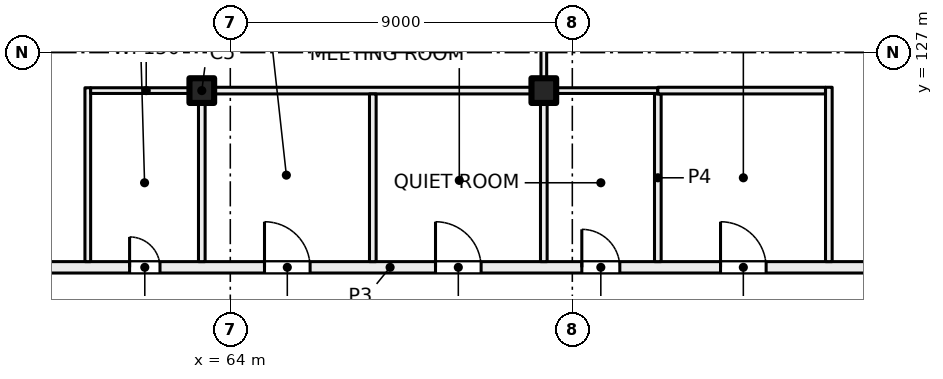
"""IFC4 building model, lengths in metres.
Left out: names, types, materials, properties, quantities, classifications, styles, units other than length and angle.
Written with IfcOpenShell. Run it as: python <this file> out.ifc"""

import sys

from ifc_helpers import new_model, si_unit, direction, frame, frame_2d, origin, origin_2d, place, context, subcontext, project, spatial, rectangle, extrude, element, fill, save


model = new_model("IFC4")
c1 = context("Model", 3, precision=1e-05, world=origin(), true_north=direction((0.0, 1.0)))
c2 = subcontext(c1, "Body", "Model", "MODEL_VIEW")
j1 = project(units=[si_unit("LENGTHUNIT", "METRE"), si_unit("PLANEANGLEUNIT", "RADIAN")], contexts=[c1])
p1 = place(None, origin())
s1 = spatial("IfcSite", under=j1, at=p1, CompositionType="ELEMENT")
p2 = place(p1, origin())
s2 = spatial("IfcBuilding", under=s1, at=p2, CompositionType="ELEMENT")
p3 = place(p2, frame((0.0, 0.0, 142.5)))
s3 = spatial("IfcBuildingStorey", under=s2, at=p3, CompositionType="ELEMENT", Elevation=142.5)
for number, where, z_axis, x_axis in (
    (1, (63.25, 126.0, 0.0), (0.0, 0.0, 1.0), (1.0, 0.0, 0.0)),
    (2, (72.25, 126.0, 0.0), (0.0, 0.0, 1.0), (1.0, 0.0, 0.0)),
):
    element("IfcColumn", number, at=place(p3, frame(where, z_axis=z_axis, x_axis=x_axis)), inside=s3, PredefinedType="COLUMN", context=c2, shape_type="SweptSolid", body=[
        extrude(rectangle(XDim=0.65, YDim=0.65, at=origin_2d()), origin(), (0.0, 0.0, 1.0), 4.0),
    ])
p4 = place(p3, frame((50.657, 121.35, 0.0), z_axis=(0.0, 0.0, 1.0), x_axis=(1.0, 0.0, 0.0)))
e3 = element("IfcWall", 3, at=p4, inside=s3, PredefinedType="PARTITIONING", context=c2, shape_type="SweptSolid", body=[
    extrude(rectangle(XDim=35.096, YDim=0.3, at=frame_2d((17.548, 0.0))), origin(), (0.0, 0.0, 1.0), 3.625),
])
p5 = place(p4, frame((26.243, 0.0, 0.0)))
e4 = element("IfcOpeningElement", 4, at=p5, cuts=e3, PredefinedType="OPENING", context=c2, shape_type="SweptSolid", body=[
    extrude(rectangle(XDim=1.2, YDim=2.1, at=frame_2d((0.6, 1.05))), frame((0.0, 0.16, 0.0), z_axis=(0.0, -1.0, 0.0), x_axis=(1.0, 0.0, 0.0)), (0.0, 0.0, 1.0), 0.32),
])
p6 = place(p4, frame((22.593, 0.0, 0.0)))
e5 = element("IfcOpeningElement", 5, at=p6, cuts=e3, PredefinedType="OPENING", context=c2, shape_type="SweptSolid", body=[
    extrude(rectangle(XDim=1.0, YDim=2.1, at=frame_2d((0.5, 1.05))), frame((0.0, 0.16, 0.0), z_axis=(0.0, -1.0, 0.0), x_axis=(1.0, 0.0, 0.0)), (0.0, 0.0, 1.0), 0.32),
])
p7 = place(p4, frame((31.193, 0.0, 0.0)))
e6 = element("IfcOpeningElement", 6, at=p7, cuts=e3, PredefinedType="OPENING", context=c2, shape_type="SweptSolid", body=[
    extrude(rectangle(XDim=1.8, YDim=2.1, at=frame_2d((0.9, 1.05))), frame((0.0, 0.16, 0.0), z_axis=(0.0, -1.0, 0.0), x_axis=(1.0, 0.0, 0.0)), (0.0, 0.0, 1.0), 0.32),
])
p8 = place(p4, frame((18.743, 0.0, 0.0)))
e7 = element("IfcOpeningElement", 7, at=p8, cuts=e3, PredefinedType="OPENING", context=c2, shape_type="SweptSolid", body=[
    extrude(rectangle(XDim=1.2, YDim=2.1, at=frame_2d((0.6, 1.05))), frame((0.0, 0.16, 0.0), z_axis=(0.0, -1.0, 0.0), x_axis=(1.0, 0.0, 0.0)), (0.0, 0.0, 1.0), 0.32),
])
p9 = place(p4, frame((14.243, 0.0, 0.0)))
e8 = element("IfcOpeningElement", 8, at=p9, cuts=e3, PredefinedType="OPENING", context=c2, shape_type="SweptSolid", body=[
    extrude(rectangle(XDim=1.2, YDim=2.1, at=frame_2d((0.6, 1.05))), frame((0.0, 0.16, 0.0), z_axis=(0.0, -1.0, 0.0), x_axis=(1.0, 0.0, 0.0)), (0.0, 0.0, 1.0), 0.32),
])
p10 = place(p4, frame((10.693, 0.0, 0.0)))
e9 = element("IfcOpeningElement", 9, at=p10, cuts=e3, PredefinedType="OPENING", context=c2, shape_type="SweptSolid", body=[
    extrude(rectangle(XDim=0.8, YDim=2.1, at=frame_2d((0.4, 1.05))), frame((0.0, 0.16, 0.0), z_axis=(0.0, -1.0, 0.0), x_axis=(1.0, 0.0, 0.0)), (0.0, 0.0, 1.0), 0.32),
])
p11 = place(p4, frame((5.693, 0.0, 0.0)))
e10 = element("IfcOpeningElement", 10, at=p11, cuts=e3, PredefinedType="OPENING", context=c2, shape_type="SweptSolid", body=[
    extrude(rectangle(XDim=1.8, YDim=2.1, at=frame_2d((0.9, 1.05))), frame((0.0, 0.16, 0.0), z_axis=(0.0, -1.0, 0.0), x_axis=(1.0, 0.0, 0.0)), (0.0, 0.0, 1.0), 0.32),
])
p12 = place(p4, frame((0.896, 0.0, 0.0)))
e11 = element("IfcOpeningElement", 11, at=p12, cuts=e3, PredefinedType="OPENING", context=c2, shape_type="SweptSolid", body=[
    extrude(rectangle(XDim=1.8, YDim=2.1, at=frame_2d((0.9, 1.05))), frame((0.0, 0.16, 0.0), z_axis=(0.0, -1.0, 0.0), x_axis=(1.0, 0.0, 0.0)), (0.0, 0.0, 1.0), 0.32),
])
p13 = place(p3, frame((60.25, 126.075, 0.0), z_axis=(0.0, 0.0, 1.0), x_axis=(0.0, -1.0, 0.0)))
e12 = element("IfcWall", 12, at=p13, inside=s3, PredefinedType="PARTITIONING", context=c2, shape_type="SweptSolid", body=[
    extrude(rectangle(XDim=4.575, YDim=0.15, at=frame_2d((2.288, 0.0))), origin(), (0.0, 0.0, 1.0), 3.625),
])
p14 = place(p3, frame((63.25, 121.5, 0.0), z_axis=(0.0, 0.0, 1.0), x_axis=(0.0, 1.0, 0.0)))
e13 = element("IfcWall", 13, at=p14, inside=s3, PredefinedType="PARTITIONING", context=c2, shape_type="SweptSolid", body=[
    extrude(rectangle(XDim=4.412, YDim=0.175, at=frame_2d((2.206, 0.0))), origin(), (0.0, 0.0, 1.0), 3.625),
])
p15 = place(p3, frame((63.25, 126.0, 0.0), z_axis=(0.0, 0.0, 1.0), x_axis=(-1.0, 0.0, 0.0)))
e14 = element("IfcWall", 14, at=p15, inside=s3, PredefinedType="PARTITIONING", context=c2, shape_type="SweptSolid", body=[
    extrude(rectangle(XDim=2.925, YDim=0.15, at=frame_2d((1.462, 0.0))), origin(), (0.0, 0.0, 1.0), 3.625),
])
p16 = place(p3, frame((63.25, 126.0, 0.0), z_axis=(0.0, 0.0, 1.0), x_axis=(1.0, 0.0, 0.0)))
e15 = element("IfcWall", 15, at=p16, inside=s3, PredefinedType="PARTITIONING", context=c2, shape_type="SweptSolid", body=[
    extrude(rectangle(XDim=9.0, YDim=0.175, at=frame_2d((4.5, 0.0))), origin(), (0.0, 0.0, 1.0), 3.625),
])
p17 = place(p3, frame((67.75, 121.5, 0.0), z_axis=(0.0, 0.0, 1.0), x_axis=(0.0, 1.0, 0.0)))
e16 = element("IfcWall", 16, at=p17, inside=s3, PredefinedType="PARTITIONING", context=c2, shape_type="SweptSolid", body=[
    extrude(rectangle(XDim=4.412, YDim=0.175, at=frame_2d((2.206, 0.0))), origin(), (0.0, 0.0, 1.0), 3.625),
])
p18 = place(p3, frame((72.25, 121.5, 0.0), z_axis=(0.0, 0.0, 1.0), x_axis=(0.0, 1.0, 0.0)))
e17 = element("IfcWall", 17, at=p18, inside=s3, PredefinedType="PARTITIONING", context=c2, shape_type="SweptSolid", body=[
    extrude(rectangle(XDim=4.5, YDim=0.175, at=frame_2d((2.25, 0.0))), origin(), (0.0, 0.0, 1.0), 3.625),
])
p19 = place(p3, frame((72.25, 126.0, 0.0), z_axis=(0.0, 0.0, 1.0), x_axis=(0.0, 1.0, 0.0)))
e18 = element("IfcWall", 18, at=p19, inside=s3, PredefinedType="PARTITIONING", context=c2, shape_type="SweptSolid", body=[
    extrude(rectangle(XDim=3.9, YDim=0.15, at=frame_2d((1.95, 0.0))), origin(), (0.0, 0.0, 1.0), 3.625),
])
p20 = place(p3, frame((75.25, 126.0, 0.0), z_axis=(0.0, 0.0, 1.0), x_axis=(-1.0, 0.0, 0.0)))
e19 = element("IfcWall", 19, at=p20, inside=s3, PredefinedType="PARTITIONING", context=c2, shape_type="SweptSolid", body=[
    extrude(rectangle(XDim=3.0, YDim=0.15, at=frame_2d((1.5, 0.0))), origin(), (0.0, 0.0, 1.0), 3.625),
])
p21 = place(p3, frame((75.25, 125.912, 0.0), z_axis=(0.0, 0.0, 1.0), x_axis=(0.0, -1.0, 0.0)))
e20 = element("IfcWall", 20, at=p21, inside=s3, PredefinedType="PARTITIONING", context=c2, shape_type="SweptSolid", body=[
    extrude(rectangle(XDim=4.412, YDim=0.175, at=frame_2d((2.206, 0.0))), origin(), (0.0, 0.0, 1.0), 3.625),
])
p22 = place(p3, frame((79.75, 121.5, 0.0), z_axis=(0.0, 0.0, 1.0), x_axis=(0.0, 1.0, 0.0)))
e21 = element("IfcWall", 21, at=p22, inside=s3, PredefinedType="PARTITIONING", context=c2, shape_type="SweptSolid", body=[
    extrude(rectangle(XDim=4.588, YDim=0.175, at=frame_2d((2.294, 0.0))), origin(), (0.0, 0.0, 1.0), 3.625),
])
p23 = place(p3, frame((79.662, 126.0, 0.0), z_axis=(0.0, 0.0, 1.0), x_axis=(-1.0, 0.0, 0.0)))
e22 = element("IfcWall", 22, at=p23, inside=s3, PredefinedType="PARTITIONING", context=c2, shape_type="SweptSolid", body=[
    extrude(rectangle(XDim=4.412, YDim=0.175, at=frame_2d((2.206, 0.0))), origin(), (0.0, 0.0, 1.0), 3.625),
])
p24 = place(p5, origin())
e23 = element("IfcDoor", 23, at=p24, inside=s3, OperationType="DOUBLE_DOOR_SINGLE_SWING", PredefinedType="DOOR", context=c2, shape_type="SweptSolid", body=[
    extrude(rectangle(XDim=1.2, YDim=2.1, at=frame_2d((0.6, 1.05))), frame((0.0, 0.025, 0.0), z_axis=(0.0, -1.0, 0.0), x_axis=(1.0, 0.0, 0.0)), (0.0, 0.0, 1.0), 0.05),
])
fill(e4, e23)
p25 = place(p6, origin())
e24 = element("IfcDoor", 24, at=p25, inside=s3, OperationType="SINGLE_SWING_LEFT", PredefinedType="DOOR", context=c2, shape_type="SweptSolid", body=[
    extrude(rectangle(XDim=1.0, YDim=2.1, at=frame_2d((0.5, 1.05))), frame((0.0, 0.025, 0.0), z_axis=(0.0, -1.0, 0.0), x_axis=(1.0, 0.0, 0.0)), (0.0, 0.0, 1.0), 0.05),
])
fill(e5, e24)
p26 = place(p8, origin())
e25 = element("IfcDoor", 25, at=p26, inside=s3, OperationType="DOUBLE_DOOR_SINGLE_SWING", PredefinedType="DOOR", context=c2, shape_type="SweptSolid", body=[
    extrude(rectangle(XDim=1.2, YDim=2.1, at=frame_2d((0.6, 1.05))), frame((0.0, 0.025, 0.0), z_axis=(0.0, -1.0, 0.0), x_axis=(1.0, 0.0, 0.0)), (0.0, 0.0, 1.0), 0.05),
])
fill(e7, e25)
p27 = place(p9, origin())
e26 = element("IfcDoor", 26, at=p27, inside=s3, OperationType="DOUBLE_DOOR_SINGLE_SWING", PredefinedType="DOOR", context=c2, shape_type="SweptSolid", body=[
    extrude(rectangle(XDim=1.2, YDim=2.1, at=frame_2d((0.6, 1.05))), frame((0.0, 0.025, 0.0), z_axis=(0.0, -1.0, 0.0), x_axis=(1.0, 0.0, 0.0)), (0.0, 0.0, 1.0), 0.05),
])
fill(e8, e26)
p28 = place(p10, origin())
e27 = element("IfcDoor", 27, at=p28, inside=s3, OperationType="SINGLE_SWING_LEFT", PredefinedType="DOOR", context=c2, shape_type="SweptSolid", body=[
    extrude(rectangle(XDim=0.8, YDim=2.1, at=frame_2d((0.4, 1.05))), frame((0.0, 0.025, 0.0), z_axis=(0.0, -1.0, 0.0), x_axis=(1.0, 0.0, 0.0)), (0.0, 0.0, 1.0), 0.05),
])
fill(e9, e27)
save(model, sys.argv[1])
